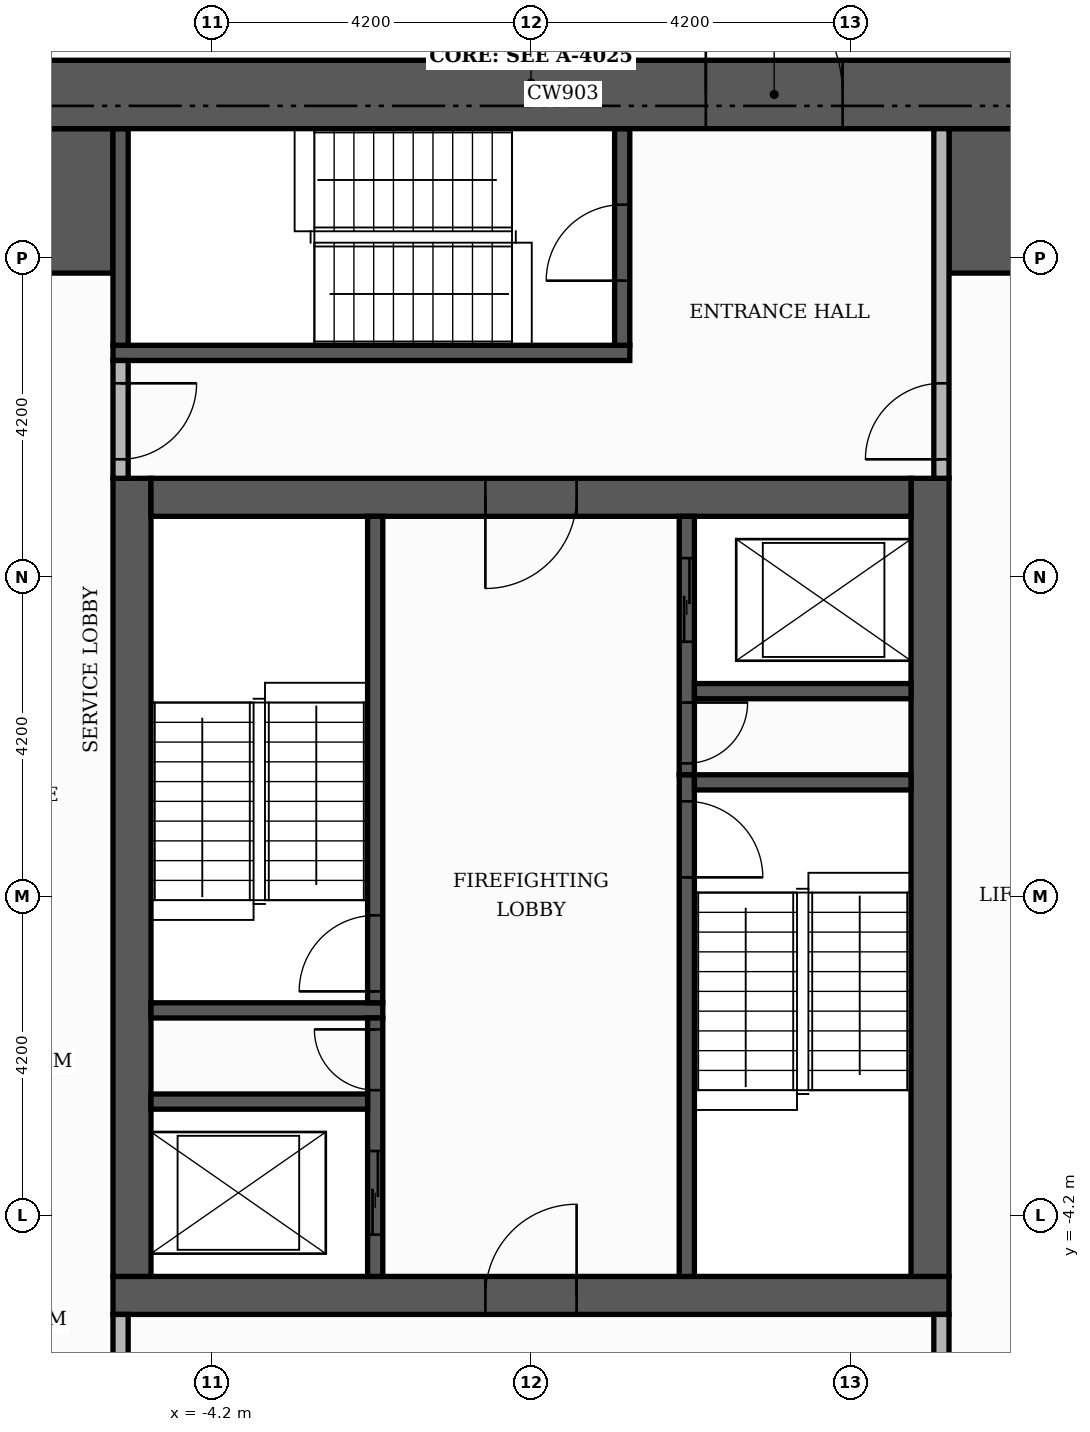
"""IFC4 building model, lengths in metres.
Left out: names, types, materials, properties, quantities, classifications, styles, units other than length and angle.
Written with IfcOpenShell. Run it as: python <this file> out.ifc"""

import sys

from ifc_helpers import new_model, si_unit, direction, frame, frame_2d, origin, place, context, subcontext, project, spatial, rectangle, extrude, element, fill, save


model = new_model("IFC4")
c1 = context("Model", 3, precision=1e-05, world=origin(), true_north=direction((0.0, 1.0)))
c2 = subcontext(c1, "Body", "Model", "MODEL_VIEW")
j1 = project(units=[si_unit("LENGTHUNIT", "METRE"), si_unit("PLANEANGLEUNIT", "RADIAN")], contexts=[c1])
p1 = place(None, origin())
s1 = spatial("IfcSite", under=j1, at=p1, CompositionType="ELEMENT")
p2 = place(p1, origin())
s2 = spatial("IfcBuilding", under=s1, at=p2, CompositionType="ELEMENT")
p3 = place(p2, frame((0.0, 0.0, 153.3)))
s3 = spatial("IfcBuildingStorey", under=s2, at=p3, CompositionType="ELEMENT", Elevation=153.3)
p4 = place(p3, frame((-5.5, -5.25, 0.0), z_axis=(0.0, 0.0, 1.0), x_axis=(1.0, 0.0, 0.0)))
e1 = element("IfcWall", 1, at=p4, inside=s3, PredefinedType="SHEAR", context=c2, shape_type="SweptSolid", body=[
    extrude(rectangle(XDim=11.0, YDim=0.5, at=frame_2d((5.5, 0.0))), origin(), (0.0, 0.0, 1.0), 3.48),
])
p5 = place(p4, frame((4.9, 0.0, 0.0)))
e2 = element("IfcOpeningElement", 2, at=p5, cuts=e1, PredefinedType="OPENING", context=c2, shape_type="SweptSolid", body=[
    extrude(rectangle(XDim=1.2, YDim=2.1, at=frame_2d((0.6, 1.05))), frame((0.0, 0.26, 0.0), z_axis=(0.0, -1.0, 0.0), x_axis=(1.0, 0.0, 0.0)), (0.0, 0.0, 1.0), 0.52),
])
for number, where, z_axis, x_axis in (
    (3, (-5.25, -5.0, 0.0), (0.0, 0.0, 1.0), (0.0, 1.0, 0.0)),
    (4, (5.25, -5.0, 0.0), (0.0, 0.0, 1.0), (0.0, 1.0, 0.0)),
):
    element("IfcWall", number, at=place(p3, frame(where, z_axis=z_axis, x_axis=x_axis)), inside=s3, PredefinedType="SHEAR", context=c2, shape_type="SweptSolid", body=[
        extrude(rectangle(XDim=10.5, YDim=0.5, at=frame_2d((5.25, 0.0))), origin(), (0.0, 0.0, 1.0), 3.48),
    ])
p6 = place(p3, frame((-5.0, 5.25, 0.0), z_axis=(0.0, 0.0, 1.0), x_axis=(1.0, 0.0, 0.0)))
e5 = element("IfcWall", 5, at=p6, inside=s3, PredefinedType="SHEAR", context=c2, shape_type="SweptSolid", body=[
    extrude(rectangle(XDim=10.0, YDim=0.5, at=frame_2d((5.0, 0.0))), origin(), (0.0, 0.0, 1.0), 3.48),
])
p7 = place(p6, frame((4.4, 0.0, 0.0)))
e6 = element("IfcOpeningElement", 6, at=p7, cuts=e5, PredefinedType="OPENING", context=c2, shape_type="SweptSolid", body=[
    extrude(rectangle(XDim=1.2, YDim=2.1, at=frame_2d((0.6, 1.05))), frame((0.0, 0.26, 0.0), z_axis=(0.0, -1.0, 0.0), x_axis=(1.0, 0.0, 0.0)), (0.0, 0.0, 1.0), 0.52),
])
for number, where, z_axis, x_axis in (
    (7, (-10.1, 9.15, 0.0), (0.0, 0.0, 1.0), (1.0, 0.0, 0.0)),
    (8, (5.5, 9.15, 0.0), (0.0, 0.0, 1.0), (1.0, 0.0, 0.0)),
):
    element("IfcWall", number, at=place(p3, frame(where, z_axis=z_axis, x_axis=x_axis)), inside=s3, PredefinedType="SHEAR", context=c2, shape_type="SweptSolid", body=[
        extrude(rectangle(XDim=4.6, YDim=1.9, at=frame_2d((2.3, 0.0))), origin(), (0.0, 0.0, 1.0), 3.48),
    ])
p8 = place(p3, frame((2.05, -5.0, 0.0), z_axis=(0.0, 0.0, 1.0), x_axis=(0.0, 1.0, 0.0)))
e9 = element("IfcWall", 9, at=p8, inside=s3, PredefinedType="SHEAR", context=c2, shape_type="SweptSolid", body=[
    extrude(rectangle(XDim=6.6, YDim=0.2, at=frame_2d((3.3, 0.0))), origin(), (0.0, 0.0, 1.0), 3.48),
])
p9 = place(p8, frame((5.25, 0.0, 0.0)))
e10 = element("IfcOpeningElement", 10, at=p9, cuts=e9, PredefinedType="OPENING", context=c2, shape_type="SweptSolid", body=[
    extrude(rectangle(XDim=1.0, YDim=2.1, at=frame_2d((0.5, 1.05))), frame((0.0, 0.11, 0.0), z_axis=(0.0, -1.0, 0.0), x_axis=(1.0, 0.0, 0.0)), (0.0, 0.0, 1.0), 0.22),
])
p10 = place(p3, frame((-5.0, -1.5, 0.0), z_axis=(0.0, 0.0, 1.0), x_axis=(1.0, 0.0, 0.0)))
e11 = element("IfcWall", 11, at=p10, inside=s3, PredefinedType="SHEAR", context=c2, shape_type="SweptSolid", body=[
    extrude(rectangle(XDim=3.05, YDim=0.2, at=frame_2d((1.525, 0.0))), origin(), (0.0, 0.0, 1.0), 3.48),
])
p11 = place(p3, frame((-2.05, -1.4, 0.0), z_axis=(0.0, 0.0, 1.0), x_axis=(0.0, 1.0, 0.0)))
e12 = element("IfcWall", 12, at=p11, inside=s3, PredefinedType="SHEAR", context=c2, shape_type="SweptSolid", body=[
    extrude(rectangle(XDim=6.4, YDim=0.2, at=frame_2d((3.2, 0.0))), origin(), (0.0, 0.0, 1.0), 3.48),
])
p12 = place(p11, frame((0.15, 0.0, 0.0)))
e13 = element("IfcOpeningElement", 13, at=p12, cuts=e12, PredefinedType="OPENING", context=c2, shape_type="SweptSolid", body=[
    extrude(rectangle(XDim=1.0, YDim=2.1, at=frame_2d((0.5, 1.05))), frame((0.0, 0.11, 0.0), z_axis=(0.0, -1.0, 0.0), x_axis=(1.0, 0.0, 0.0)), (0.0, 0.0, 1.0), 0.22),
])
p13 = place(p3, frame((2.15, 1.5, 0.0), z_axis=(0.0, 0.0, 1.0), x_axis=(1.0, 0.0, 0.0)))
e14 = element("IfcWall", 14, at=p13, inside=s3, PredefinedType="SHEAR", context=c2, shape_type="SweptSolid", body=[
    extrude(rectangle(XDim=2.85, YDim=0.2, at=frame_2d((1.425, 0.0))), origin(), (0.0, 0.0, 1.0), 3.48),
])
p14 = place(p3, frame((-5.5, 7.15, 0.0), z_axis=(0.0, 0.0, 1.0), x_axis=(1.0, 0.0, 0.0)))
e15 = element("IfcWall", 15, at=p14, inside=s3, PredefinedType="SHEAR", context=c2, shape_type="SweptSolid", body=[
    extrude(rectangle(XDim=6.8, YDim=0.2, at=frame_2d((3.4, 0.0))), origin(), (0.0, 0.0, 1.0), 3.48),
])
p15 = place(p3, frame((-5.4, 7.25, 0.0), z_axis=(0.0, 0.0, 1.0), x_axis=(0.0, 1.0, 0.0)))
e16 = element("IfcWall", 16, at=p15, inside=s3, PredefinedType="SHEAR", context=c2, shape_type="SweptSolid", body=[
    extrude(rectangle(XDim=2.85, YDim=0.2, at=frame_2d((1.425, 0.0))), origin(), (0.0, 0.0, 1.0), 3.48),
])
p16 = place(p3, frame((1.2, 7.25, 0.0), z_axis=(0.0, 0.0, 1.0), x_axis=(0.0, 1.0, 0.0)))
e17 = element("IfcWall", 17, at=p16, inside=s3, PredefinedType="SHEAR", context=c2, shape_type="SweptSolid", body=[
    extrude(rectangle(XDim=2.85, YDim=0.2, at=frame_2d((1.425, 0.0))), origin(), (0.0, 0.0, 1.0), 3.48),
])
p17 = place(p16, frame((0.85, 0.0, 0.0)))
e18 = element("IfcOpeningElement", 18, at=p17, cuts=e17, PredefinedType="OPENING", context=c2, shape_type="SweptSolid", body=[
    extrude(rectangle(XDim=1.0, YDim=2.1, at=frame_2d((0.5, 1.05))), frame((0.0, 0.11, 0.0), z_axis=(0.0, -1.0, 0.0), x_axis=(1.0, 0.0, 0.0)), (0.0, 0.0, 1.0), 0.22),
])
p18 = place(p3, frame((-2.05, -5.0, 0.0), z_axis=(0.0, 0.0, 1.0), x_axis=(0.0, 1.0, 0.0)))
e19 = element("IfcWall", 19, at=p18, inside=s3, PredefinedType="SHEAR", context=c2, shape_type="SweptSolid", body=[
    extrude(rectangle(XDim=3.4, YDim=0.2, at=frame_2d((1.7, 0.0))), origin(), (0.0, 0.0, 1.0), 3.48),
])
p19 = place(p18, frame((0.55, 0.0, 0.0)))
e20 = element("IfcOpeningElement", 20, at=p19, cuts=e19, PredefinedType="OPENING", context=c2, shape_type="SweptSolid", body=[
    extrude(rectangle(XDim=1.1, YDim=2.1, at=frame_2d((0.55, 1.05))), frame((0.0, 0.11, 0.0), z_axis=(0.0, -1.0, 0.0), x_axis=(1.0, 0.0, 0.0)), (0.0, 0.0, 1.0), 0.22),
])
p20 = place(p18, frame((2.45, 0.0, 0.0)))
e21 = element("IfcOpeningElement", 21, at=p20, cuts=e19, PredefinedType="OPENING", context=c2, shape_type="SweptSolid", body=[
    extrude(rectangle(XDim=0.8, YDim=2.1, at=frame_2d((0.4, 1.05))), frame((0.0, 0.11, 0.0), z_axis=(0.0, -1.0, 0.0), x_axis=(1.0, 0.0, 0.0)), (0.0, 0.0, 1.0), 0.22),
])
p21 = place(p3, frame((-5.0, -2.7, 0.0), z_axis=(0.0, 0.0, 1.0), x_axis=(1.0, 0.0, 0.0)))
e22 = element("IfcWall", 22, at=p21, inside=s3, PredefinedType="SHEAR", context=c2, shape_type="SweptSolid", body=[
    extrude(rectangle(XDim=2.85, YDim=0.2, at=frame_2d((1.425, 0.0))), origin(), (0.0, 0.0, 1.0), 3.48),
])
p22 = place(p3, frame((2.05, 1.6, 0.0), z_axis=(0.0, 0.0, 1.0), x_axis=(0.0, 1.0, 0.0)))
e23 = element("IfcWall", 23, at=p22, inside=s3, PredefinedType="SHEAR", context=c2, shape_type="SweptSolid", body=[
    extrude(rectangle(XDim=3.4, YDim=0.2, at=frame_2d((1.7, 0.0))), origin(), (0.0, 0.0, 1.0), 3.48),
])
p23 = place(p22, frame((1.75, 0.0, 0.0)))
e24 = element("IfcOpeningElement", 24, at=p23, cuts=e23, PredefinedType="OPENING", context=c2, shape_type="SweptSolid", body=[
    extrude(rectangle(XDim=1.1, YDim=2.1, at=frame_2d((0.55, 1.05))), frame((0.0, 0.11, 0.0), z_axis=(0.0, -1.0, 0.0), x_axis=(1.0, 0.0, 0.0)), (0.0, 0.0, 1.0), 0.22),
])
p24 = place(p22, frame((0.15, 0.0, 0.0)))
e25 = element("IfcOpeningElement", 25, at=p24, cuts=e23, PredefinedType="OPENING", context=c2, shape_type="SweptSolid", body=[
    extrude(rectangle(XDim=0.8, YDim=2.1, at=frame_2d((0.4, 1.05))), frame((0.0, 0.11, 0.0), z_axis=(0.0, -1.0, 0.0), x_axis=(1.0, 0.0, 0.0)), (0.0, 0.0, 1.0), 0.22),
])
p25 = place(p3, frame((2.15, 2.7, 0.0), z_axis=(0.0, 0.0, 1.0), x_axis=(1.0, 0.0, 0.0)))
e26 = element("IfcWall", 26, at=p25, inside=s3, PredefinedType="SHEAR", context=c2, shape_type="SweptSolid", body=[
    extrude(rectangle(XDim=2.85, YDim=0.2, at=frame_2d((1.425, 0.0))), origin(), (0.0, 0.0, 1.0), 3.48),
])
p26 = place(p3, frame((-11.0, 10.55, 0.0), z_axis=(0.0, 0.0, 1.0), x_axis=(1.0, 0.0, 0.0)))
e27 = element("IfcWall", 27, at=p26, inside=s3, PredefinedType="SHEAR", context=c2, shape_type="SweptSolid", body=[
    extrude(rectangle(XDim=22.0, YDim=0.9, at=frame_2d((11.0, 0.0))), origin(), (0.0, 0.0, 1.0), 3.48),
])
p27 = place(p26, frame((13.3, 0.0, 0.0)))
e28 = element("IfcOpeningElement", 28, at=p27, cuts=e27, PredefinedType="OPENING", context=c2, shape_type="SweptSolid", body=[
    extrude(rectangle(XDim=1.8, YDim=2.2, at=frame_2d((0.9, 1.1))), frame((0.0, 0.46, 0.0), z_axis=(0.0, -1.0, 0.0), x_axis=(1.0, 0.0, 0.0)), (0.0, 0.0, 1.0), 0.92),
])
p28 = place(p3, frame((-5.4, -10.1, 0.0), z_axis=(0.0, 0.0, 1.0), x_axis=(0.0, 1.0, 0.0)))
e29 = element("IfcWall", 29, at=p28, inside=s3, PredefinedType="PARTITIONING", context=c2, shape_type="SweptSolid", body=[
    extrude(rectangle(XDim=4.6, YDim=0.2, at=frame_2d((2.3, 0.0))), origin(), (0.0, 0.0, 1.0), 3.48),
])
p29 = place(p28, frame((2.9, 0.0, 0.0)))
e30 = element("IfcOpeningElement", 30, at=p29, cuts=e29, PredefinedType="OPENING", context=c2, shape_type="SweptSolid", body=[
    extrude(rectangle(XDim=1.0, YDim=2.1, at=frame_2d((0.5, 1.05))), frame((0.0, 0.11, 0.0), z_axis=(0.0, -1.0, 0.0), x_axis=(1.0, 0.0, 0.0)), (0.0, 0.0, 1.0), 0.22),
])
p30 = place(p3, frame((5.4, -10.1, 0.0), z_axis=(0.0, 0.0, 1.0), x_axis=(0.0, 1.0, 0.0)))
e31 = element("IfcWall", 31, at=p30, inside=s3, PredefinedType="PARTITIONING", context=c2, shape_type="SweptSolid", body=[
    extrude(rectangle(XDim=4.6, YDim=0.2, at=frame_2d((2.3, 0.0))), origin(), (0.0, 0.0, 1.0), 3.48),
])
p31 = place(p30, frame((2.9, 0.0, 0.0)))
e32 = element("IfcOpeningElement", 32, at=p31, cuts=e31, PredefinedType="OPENING", context=c2, shape_type="SweptSolid", body=[
    extrude(rectangle(XDim=1.0, YDim=2.1, at=frame_2d((0.5, 1.05))), frame((0.0, 0.11, 0.0), z_axis=(0.0, -1.0, 0.0), x_axis=(1.0, 0.0, 0.0)), (0.0, 0.0, 1.0), 0.22),
])
p32 = place(p3, frame((-5.4, 5.5, 0.0), z_axis=(0.0, 0.0, 1.0), x_axis=(0.0, 1.0, 0.0)))
e33 = element("IfcWall", 33, at=p32, inside=s3, PredefinedType="PARTITIONING", context=c2, shape_type="SweptSolid", body=[
    extrude(rectangle(XDim=1.55, YDim=0.2, at=frame_2d((0.775, 0.0))), origin(), (0.0, 0.0, 1.0), 3.48),
])
p33 = place(p32, frame((0.25, 0.0, 0.0)))
e34 = element("IfcOpeningElement", 34, at=p33, cuts=e33, PredefinedType="OPENING", context=c2, shape_type="SweptSolid", body=[
    extrude(rectangle(XDim=1.0, YDim=2.1, at=frame_2d((0.5, 1.05))), frame((0.0, 0.11, 0.0), z_axis=(0.0, -1.0, 0.0), x_axis=(1.0, 0.0, 0.0)), (0.0, 0.0, 1.0), 0.22),
])
p34 = place(p3, frame((5.4, 5.5, 0.0), z_axis=(0.0, 0.0, 1.0), x_axis=(0.0, 1.0, 0.0)))
e35 = element("IfcWall", 35, at=p34, inside=s3, PredefinedType="PARTITIONING", context=c2, shape_type="SweptSolid", body=[
    extrude(rectangle(XDim=4.6, YDim=0.2, at=frame_2d((2.3, 0.0))), origin(), (0.0, 0.0, 1.0), 3.48),
])
p35 = place(p34, frame((0.25, 0.0, 0.0)))
e36 = element("IfcOpeningElement", 36, at=p35, cuts=e35, PredefinedType="OPENING", context=c2, shape_type="SweptSolid", body=[
    extrude(rectangle(XDim=1.0, YDim=2.1, at=frame_2d((0.5, 1.05))), frame((0.0, 0.11, 0.0), z_axis=(0.0, -1.0, 0.0), x_axis=(1.0, 0.0, 0.0)), (0.0, 0.0, 1.0), 0.22),
])
p36 = place(p23, origin())
e37 = element("IfcDoor", 37, at=p36, inside=s3, OperationType="SLIDING_TO_LEFT", PredefinedType="DOOR", context=c2, shape_type="SweptSolid", body=[
    extrude(rectangle(XDim=1.1, YDim=2.1, at=frame_2d((0.55, 1.05))), frame((0.0, 0.025, 0.0), z_axis=(0.0, -1.0, 0.0), x_axis=(1.0, 0.0, 0.0)), (0.0, 0.0, 1.0), 0.05),
])
fill(e24, e37)
p37 = place(p19, origin())
e38 = element("IfcDoor", 38, at=p37, inside=s3, OperationType="SLIDING_TO_LEFT", PredefinedType="DOOR", context=c2, shape_type="SweptSolid", body=[
    extrude(rectangle(XDim=1.1, YDim=2.1, at=frame_2d((0.55, 1.05))), frame((0.0, 0.025, 0.0), z_axis=(0.0, -1.0, 0.0), x_axis=(1.0, 0.0, 0.0)), (0.0, 0.0, 1.0), 0.05),
])
fill(e20, e38)
p38 = place(p12, origin())
e39 = element("IfcDoor", 39, at=p38, inside=s3, OperationType="SINGLE_SWING_LEFT", PredefinedType="DOOR", context=c2, shape_type="SweptSolid", body=[
    extrude(rectangle(XDim=1.0, YDim=2.1, at=frame_2d((0.5, 1.05))), frame((0.0, 0.025, 0.0), z_axis=(0.0, -1.0, 0.0), x_axis=(1.0, 0.0, 0.0)), (0.0, 0.0, 1.0), 0.05),
])
fill(e13, e39)
p39 = place(p9, frame((1.0, 0.0, 0.0), z_axis=(0.0, 0.0, 1.0), x_axis=(-1.0, 0.0, 0.0)))
e40 = element("IfcDoor", 40, at=p39, inside=s3, OperationType="SINGLE_SWING_LEFT", PredefinedType="DOOR", context=c2, shape_type="SweptSolid", body=[
    extrude(rectangle(XDim=1.0, YDim=2.1, at=frame_2d((0.5, 1.05))), frame((0.0, 0.025, 0.0), z_axis=(0.0, -1.0, 0.0), x_axis=(1.0, 0.0, 0.0)), (0.0, 0.0, 1.0), 0.05),
])
fill(e10, e40)
p40 = place(p24, frame((0.8, 0.0, 0.0), z_axis=(0.0, 0.0, 1.0), x_axis=(-1.0, 0.0, 0.0)))
e41 = element("IfcDoor", 41, at=p40, inside=s3, OperationType="SINGLE_SWING_RIGHT", PredefinedType="DOOR", context=c2, shape_type="SweptSolid", body=[
    extrude(rectangle(XDim=0.8, YDim=2.1, at=frame_2d((0.4, 1.05))), frame((0.0, 0.025, 0.0), z_axis=(0.0, -1.0, 0.0), x_axis=(1.0, 0.0, 0.0)), (0.0, 0.0, 1.0), 0.05),
])
fill(e25, e41)
p41 = place(p20, origin())
e42 = element("IfcDoor", 42, at=p41, inside=s3, OperationType="SINGLE_SWING_RIGHT", PredefinedType="DOOR", context=c2, shape_type="SweptSolid", body=[
    extrude(rectangle(XDim=0.8, YDim=2.1, at=frame_2d((0.4, 1.05))), frame((0.0, 0.025, 0.0), z_axis=(0.0, -1.0, 0.0), x_axis=(1.0, 0.0, 0.0)), (0.0, 0.0, 1.0), 0.05),
])
fill(e21, e42)
p42 = place(p7, frame((1.2, 0.0, 0.0), z_axis=(0.0, 0.0, 1.0), x_axis=(-1.0, 0.0, 0.0)))
e43 = element("IfcDoor", 43, at=p42, inside=s3, OperationType="SINGLE_SWING_LEFT", PredefinedType="DOOR", context=c2, shape_type="SweptSolid", body=[
    extrude(rectangle(XDim=1.2, YDim=2.1, at=frame_2d((0.6, 1.05))), frame((0.0, 0.025, 0.0), z_axis=(0.0, -1.0, 0.0), x_axis=(1.0, 0.0, 0.0)), (0.0, 0.0, 1.0), 0.05),
])
fill(e6, e43)
p43 = place(p5, origin())
e44 = element("IfcDoor", 44, at=p43, inside=s3, OperationType="SINGLE_SWING_RIGHT", PredefinedType="DOOR", context=c2, shape_type="SweptSolid", body=[
    extrude(rectangle(XDim=1.2, YDim=2.1, at=frame_2d((0.6, 1.05))), frame((0.0, 0.025, 0.0), z_axis=(0.0, -1.0, 0.0), x_axis=(1.0, 0.0, 0.0)), (0.0, 0.0, 1.0), 0.05),
])
fill(e2, e44)
p44 = place(p17, origin())
e45 = element("IfcDoor", 45, at=p44, inside=s3, OperationType="SINGLE_SWING_LEFT", PredefinedType="DOOR", context=c2, shape_type="SweptSolid", body=[
    extrude(rectangle(XDim=1.0, YDim=2.1, at=frame_2d((0.5, 1.05))), frame((0.0, 0.025, 0.0), z_axis=(0.0, -1.0, 0.0), x_axis=(1.0, 0.0, 0.0)), (0.0, 0.0, 1.0), 0.05),
])
fill(e18, e45)
p45 = place(p33, frame((1.0, 0.0, 0.0), z_axis=(0.0, 0.0, 1.0), x_axis=(-1.0, 0.0, 0.0)))
e46 = element("IfcDoor", 46, at=p45, inside=s3, OperationType="SINGLE_SWING_RIGHT", PredefinedType="DOOR", context=c2, shape_type="SweptSolid", body=[
    extrude(rectangle(XDim=1.0, YDim=2.1, at=frame_2d((0.5, 1.05))), frame((0.0, 0.025, 0.0), z_axis=(0.0, -1.0, 0.0), x_axis=(1.0, 0.0, 0.0)), (0.0, 0.0, 1.0), 0.05),
])
fill(e34, e46)
p46 = place(p35, origin())
e47 = element("IfcDoor", 47, at=p46, inside=s3, OperationType="SINGLE_SWING_LEFT", PredefinedType="DOOR", context=c2, shape_type="SweptSolid", body=[
    extrude(rectangle(XDim=1.0, YDim=2.1, at=frame_2d((0.5, 1.05))), frame((0.0, 0.025, 0.0), z_axis=(0.0, -1.0, 0.0), x_axis=(1.0, 0.0, 0.0)), (0.0, 0.0, 1.0), 0.05),
])
fill(e36, e47)
p47 = place(p27, origin())
e48 = element("IfcDoor", 48, at=p47, inside=s3, OperationType="DOUBLE_DOOR_SINGLE_SWING", PredefinedType="DOOR", context=c2, shape_type="SweptSolid", body=[
    extrude(rectangle(XDim=1.8, YDim=2.2, at=frame_2d((0.9, 1.1))), frame((0.0, 0.025, 0.0), z_axis=(0.0, -1.0, 0.0), x_axis=(1.0, 0.0, 0.0)), (0.0, 0.0, 1.0), 0.05),
])
fill(e28, e48)
save(model, sys.argv[1])
